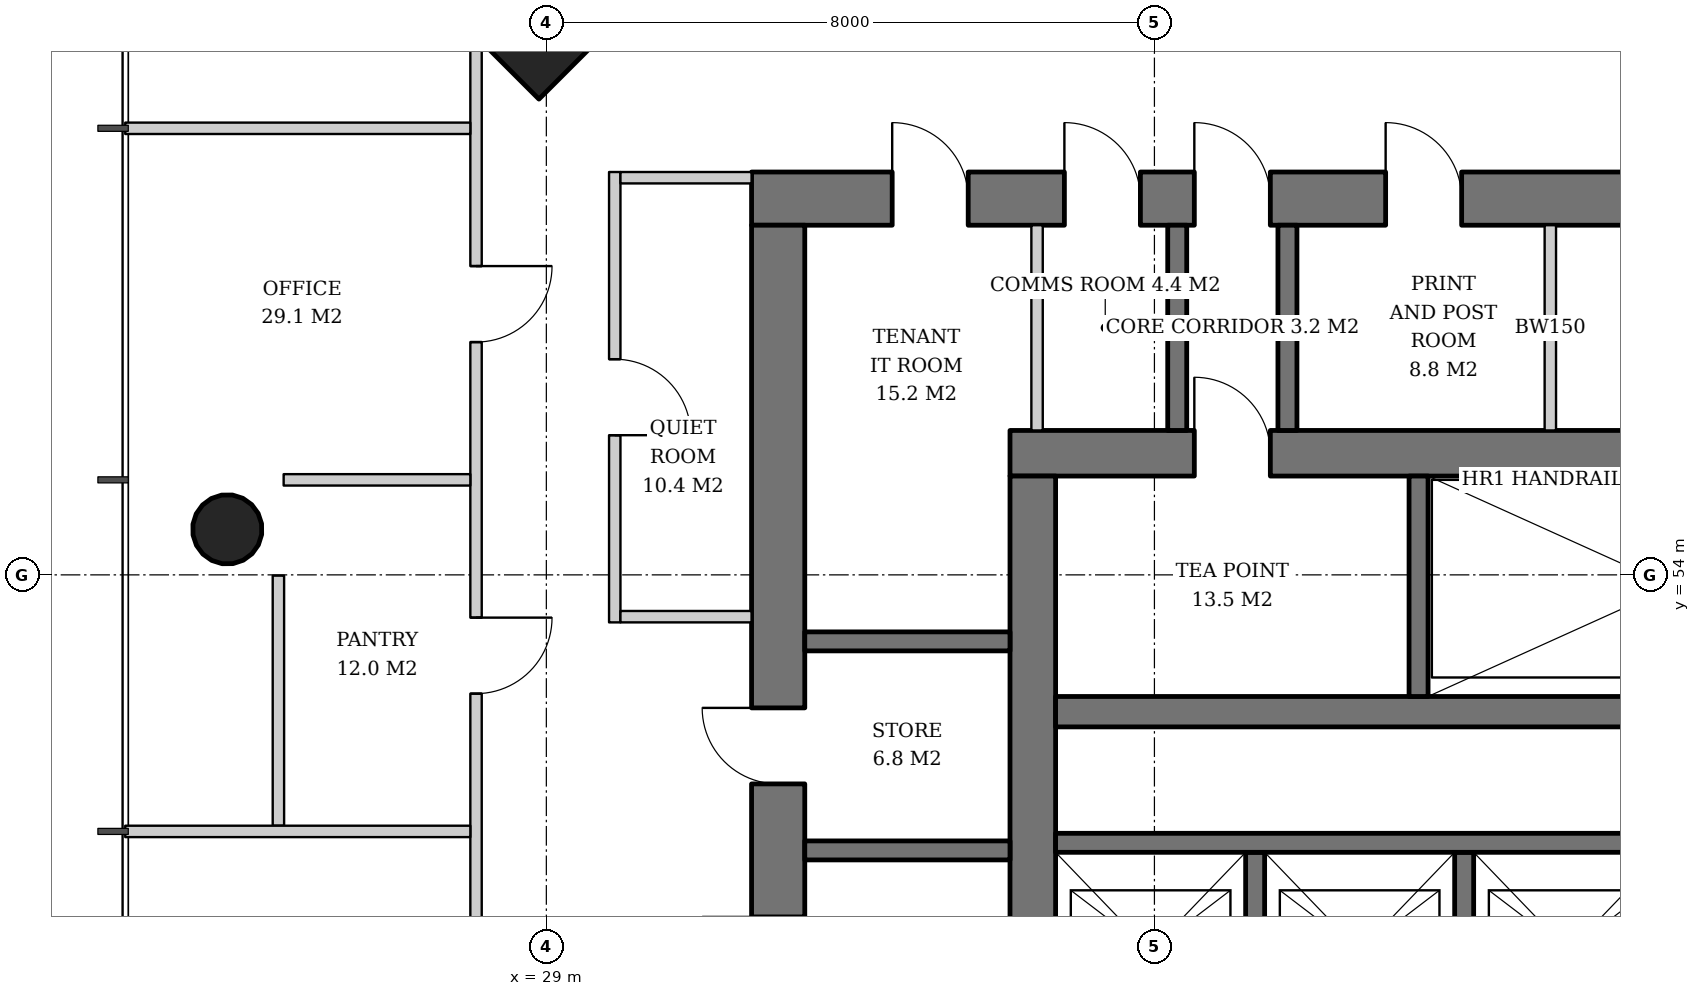
"""IFC4 building model, lengths in metres.
Left out: names, types, materials, properties, quantities, classifications, styles, units other than length and angle.
Written with IfcOpenShell. Run it as: python <this file> out.ifc"""

import sys

from ifc_helpers import new_model, si_unit, direction, frame, frame_2d, origin, origin_2d, place, context, subcontext, project, spatial, rectangle, hollow_circle, extrude, element, fill, save


model = new_model("IFC4")
c1 = context("Model", 3, precision=1e-05, world=origin(), true_north=direction((0.0, 1.0)))
c2 = subcontext(c1, "Body", "Model", "MODEL_VIEW")
j1 = project(units=[si_unit("LENGTHUNIT", "METRE"), si_unit("PLANEANGLEUNIT", "RADIAN")], contexts=[c1])
p1 = place(None, origin())
s1 = spatial("IfcSite", under=j1, at=p1, CompositionType="ELEMENT")
p2 = place(p1, origin())
s2 = spatial("IfcBuilding", under=s1, at=p2, CompositionType="ELEMENT")
p3 = place(p2, frame((0.0, 0.0, 138.8)))
s3 = spatial("IfcBuildingStorey", under=s2, at=p3, CompositionType="ELEMENT", Elevation=138.8)
p4 = place(p3, frame((28.864, 62.136, 0.0), z_axis=(0.031898107953, -0.031898107953, 0.998981992539), x_axis=(0.707106781187, 0.707106781187, 0.0)))
e1 = element("IfcColumn", 1, at=p4, inside=s3, PredefinedType="COLUMN", context=c2, shape_type="SweptSolid", body=[
    extrude(rectangle(XDim=2.6, YDim=2.6, at=origin_2d()), origin(), (0.0, 0.0, 1.0), 3.804),
])
p5 = place(p3, frame((24.764, 54.618, 0.0), z_axis=(0.031910269556, -0.015987237665, 0.999362868496), x_axis=(0.447933021895, 0.894067115991, 0.0)))
e2 = element("IfcColumn", 2, at=p5, inside=s3, PredefinedType="COLUMN", context=c2, shape_type="SweptSolid", body=[
    extrude(hollow_circle(Radius=0.457, WallThickness=0.03, at=origin_2d()), origin(), (0.0, 0.0, 1.0), 3.802),
])
p6 = place(p3, frame((35.1, 55.6, 0.0), z_axis=(0.0, 0.0, 1.0), x_axis=(1.0, 0.0, 0.0)))
e3 = element("IfcWall", 3, at=p6, inside=s3, PredefinedType="SHEAR", context=c2, shape_type="SweptSolid", body=[
    extrude(rectangle(XDim=19.8, YDim=0.6, at=frame_2d((9.9, 0.0))), origin(), (0.0, 0.0, 1.0), 3.8),
])
p7 = place(p6, frame((14.54, 0.0, 0.0)))
e4 = element("IfcOpeningElement", 4, at=p7, cuts=e3, PredefinedType="OPENING", context=c2, shape_type="SweptSolid", body=[
    extrude(rectangle(XDim=1.0, YDim=2.1, at=frame_2d((0.5, 1.05))), frame((0.0, 0.31, 0.0), z_axis=(0.0, -1.0, 0.0), x_axis=(1.0, 0.0, 0.0)), (0.0, 0.0, 1.0), 0.62),
])
p8 = place(p6, frame((2.425, 0.0, 0.0)))
e5 = element("IfcOpeningElement", 5, at=p8, cuts=e3, PredefinedType="OPENING", context=c2, shape_type="SweptSolid", body=[
    extrude(rectangle(XDim=1.0, YDim=2.1, at=frame_2d((0.5, 1.05))), frame((0.0, 0.31, 0.0), z_axis=(0.0, -1.0, 0.0), x_axis=(1.0, 0.0, 0.0)), (0.0, 0.0, 1.0), 0.62),
])
p9 = place(p3, frame((35.4, 36.7, 0.0), z_axis=(0.0, 0.0, 1.0), x_axis=(0.0, 1.0, 0.0)))
e6 = element("IfcWall", 6, at=p9, inside=s3, PredefinedType="SHEAR", context=c2, shape_type="SweptSolid", body=[
    extrude(rectangle(XDim=18.6, YDim=0.6, at=frame_2d((9.3, 0.0))), origin(), (0.0, 0.0, 1.0), 3.8),
])
p10 = place(p9, frame((8.4, 0.0, 0.0)))
e7 = element("IfcOpeningElement", 7, at=p10, cuts=e6, PredefinedType="OPENING", context=c2, shape_type="SweptSolid", body=[
    extrude(rectangle(XDim=1.8, YDim=2.4, at=frame_2d((0.9, 1.2))), frame((0.0, 0.31, 0.0), z_axis=(0.0, -1.0, 0.0), x_axis=(1.0, 0.0, 0.0)), (0.0, 0.0, 1.0), 0.62),
])
p11 = place(p3, frame((31.7, 58.95, 0.0), z_axis=(0.0, 0.0, 1.0), x_axis=(1.0, 0.0, 0.0)))
e8 = element("IfcWall", 8, at=p11, inside=s3, PredefinedType="SHEAR", context=c2, shape_type="SweptSolid", body=[
    extrude(rectangle(XDim=26.6, YDim=0.7, at=frame_2d((13.3, 0.0))), origin(), (0.0, 0.0, 1.0), 3.8),
])
p12 = place(p11, frame((17.94, 0.0, 0.0)))
e9 = element("IfcOpeningElement", 9, at=p12, cuts=e8, PredefinedType="OPENING", context=c2, shape_type="SweptSolid", body=[
    extrude(rectangle(XDim=1.0, YDim=2.1, at=frame_2d((0.5, 1.05))), frame((0.0, 0.36, 0.0), z_axis=(0.0, -1.0, 0.0), x_axis=(1.0, 0.0, 0.0)), (0.0, 0.0, 1.0), 0.72),
])
p13 = place(p11, frame((5.825, 0.0, 0.0)))
e10 = element("IfcOpeningElement", 10, at=p13, cuts=e8, PredefinedType="OPENING", context=c2, shape_type="SweptSolid", body=[
    extrude(rectangle(XDim=1.0, YDim=2.1, at=frame_2d((0.5, 1.05))), frame((0.0, 0.36, 0.0), z_axis=(0.0, -1.0, 0.0), x_axis=(1.0, 0.0, 0.0)), (0.0, 0.0, 1.0), 0.72),
])
p14 = place(p11, frame((1.85, 0.0, 0.0)))
e11 = element("IfcOpeningElement", 11, at=p14, cuts=e8, PredefinedType="OPENING", context=c2, shape_type="SweptSolid", body=[
    extrude(rectangle(XDim=1.0, YDim=2.1, at=frame_2d((0.5, 1.05))), frame((0.0, 0.36, 0.0), z_axis=(0.0, -1.0, 0.0), x_axis=(1.0, 0.0, 0.0)), (0.0, 0.0, 1.0), 0.72),
])
p15 = place(p11, frame((4.115, 0.0, 0.0)))
e12 = element("IfcOpeningElement", 12, at=p15, cuts=e8, PredefinedType="OPENING", context=c2, shape_type="SweptSolid", body=[
    extrude(rectangle(XDim=1.0, YDim=2.1, at=frame_2d((0.5, 1.05))), frame((0.0, 0.36, 0.0), z_axis=(0.0, -1.0, 0.0), x_axis=(1.0, 0.0, 0.0)), (0.0, 0.0, 1.0), 0.72),
])
p16 = place(p11, frame((8.342, 0.0, 0.0)))
e13 = element("IfcOpeningElement", 13, at=p16, cuts=e8, PredefinedType="OPENING", context=c2, shape_type="SweptSolid", body=[
    extrude(rectangle(XDim=1.0, YDim=2.1, at=frame_2d((0.5, 1.05))), frame((0.0, 0.36, 0.0), z_axis=(0.0, -1.0, 0.0), x_axis=(1.0, 0.0, 0.0)), (0.0, 0.0, 1.0), 0.72),
])
p17 = place(p11, frame((11.626, 0.0, 0.0)))
e14 = element("IfcOpeningElement", 14, at=p17, cuts=e8, PredefinedType="OPENING", context=c2, shape_type="SweptSolid", body=[
    extrude(rectangle(XDim=1.0, YDim=2.1, at=frame_2d((0.5, 1.05))), frame((0.0, 0.36, 0.0), z_axis=(0.0, -1.0, 0.0), x_axis=(1.0, 0.0, 0.0)), (0.0, 0.0, 1.0), 0.72),
])
p18 = place(p11, frame((14.862, 0.0, 0.0)))
e15 = element("IfcOpeningElement", 15, at=p18, cuts=e8, PredefinedType="OPENING", context=c2, shape_type="SweptSolid", body=[
    extrude(rectangle(XDim=1.0, YDim=2.1, at=frame_2d((0.5, 1.05))), frame((0.0, 0.36, 0.0), z_axis=(0.0, -1.0, 0.0), x_axis=(1.0, 0.0, 0.0)), (0.0, 0.0, 1.0), 0.72),
])
p19 = place(p11, frame((20.9, 0.0, 0.0)))
e16 = element("IfcOpeningElement", 16, at=p19, cuts=e8, PredefinedType="OPENING", context=c2, shape_type="SweptSolid", body=[
    extrude(rectangle(XDim=1.0, YDim=2.1, at=frame_2d((0.5, 1.05))), frame((0.0, 0.36, 0.0), z_axis=(0.0, -1.0, 0.0), x_axis=(1.0, 0.0, 0.0)), (0.0, 0.0, 1.0), 0.72),
])
p20 = place(p11, frame((23.75, 0.0, 0.0)))
e17 = element("IfcOpeningElement", 17, at=p20, cuts=e8, PredefinedType="OPENING", context=c2, shape_type="SweptSolid", body=[
    extrude(rectangle(XDim=1.0, YDim=2.1, at=frame_2d((0.5, 1.05))), frame((0.0, 0.36, 0.0), z_axis=(0.0, -1.0, 0.0), x_axis=(1.0, 0.0, 0.0)), (0.0, 0.0, 1.0), 0.72),
])
p21 = place(p3, frame((32.05, 33.4, 0.0), z_axis=(0.0, 0.0, 1.0), x_axis=(0.0, 1.0, 0.0)))
e18 = element("IfcWall", 18, at=p21, inside=s3, PredefinedType="SHEAR", context=c2, shape_type="SweptSolid", body=[
    extrude(rectangle(XDim=25.2, YDim=0.7, at=frame_2d((12.6, 0.0))), origin(), (0.0, 0.0, 1.0), 3.8),
])
p22 = place(p21, frame((11.7, 0.0, 0.0)))
e19 = element("IfcOpeningElement", 19, at=p22, cuts=e18, PredefinedType="OPENING", context=c2, shape_type="SweptSolid", body=[
    extrude(rectangle(XDim=1.8, YDim=2.4, at=frame_2d((0.9, 1.2))), frame((0.0, 0.36, 0.0), z_axis=(0.0, -1.0, 0.0), x_axis=(1.0, 0.0, 0.0)), (0.0, 0.0, 1.0), 0.72),
])
p23 = place(p21, frame((3.6, 0.0, 0.0)))
e20 = element("IfcOpeningElement", 20, at=p23, cuts=e18, PredefinedType="OPENING", context=c2, shape_type="SweptSolid", body=[
    extrude(rectangle(XDim=1.0, YDim=2.1, at=frame_2d((0.5, 1.05))), frame((0.0, 0.36, 0.0), z_axis=(0.0, -1.0, 0.0), x_axis=(1.0, 0.0, 0.0)), (0.0, 0.0, 1.0), 0.72),
])
p24 = place(p21, frame((6.35, 0.0, 0.0)))
e21 = element("IfcOpeningElement", 21, at=p24, cuts=e18, PredefinedType="OPENING", context=c2, shape_type="SweptSolid", body=[
    extrude(rectangle(XDim=1.0, YDim=2.1, at=frame_2d((0.5, 1.05))), frame((0.0, 0.36, 0.0), z_axis=(0.0, -1.0, 0.0), x_axis=(1.0, 0.0, 0.0)), (0.0, 0.0, 1.0), 0.72),
])
p25 = place(p21, frame((9.1, 0.0, 0.0)))
e22 = element("IfcOpeningElement", 22, at=p25, cuts=e18, PredefinedType="OPENING", context=c2, shape_type="SweptSolid", body=[
    extrude(rectangle(XDim=1.0, YDim=2.1, at=frame_2d((0.5, 1.05))), frame((0.0, 0.36, 0.0), z_axis=(0.0, -1.0, 0.0), x_axis=(1.0, 0.0, 0.0)), (0.0, 0.0, 1.0), 0.72),
])
p26 = place(p21, frame((15.1, 0.0, 0.0)))
e23 = element("IfcOpeningElement", 23, at=p26, cuts=e18, PredefinedType="OPENING", context=c2, shape_type="SweptSolid", body=[
    extrude(rectangle(XDim=1.0, YDim=2.1, at=frame_2d((0.5, 1.05))), frame((0.0, 0.36, 0.0), z_axis=(0.0, -1.0, 0.0), x_axis=(1.0, 0.0, 0.0)), (0.0, 0.0, 1.0), 0.72),
])
p27 = place(p21, frame((17.85, 0.0, 0.0)))
e24 = element("IfcOpeningElement", 24, at=p27, cuts=e18, PredefinedType="OPENING", context=c2, shape_type="SweptSolid", body=[
    extrude(rectangle(XDim=1.0, YDim=2.1, at=frame_2d((0.5, 1.05))), frame((0.0, 0.36, 0.0), z_axis=(0.0, -1.0, 0.0), x_axis=(1.0, 0.0, 0.0)), (0.0, 0.0, 1.0), 0.72),
])
p28 = place(p3, frame((35.7, 52.2, 0.0), z_axis=(0.0, 0.0, 1.0), x_axis=(1.0, 0.0, 0.0)))
e25 = element("IfcWall", 25, at=p28, inside=s3, PredefinedType="SHEAR", context=c2, shape_type="SweptSolid", body=[
    extrude(rectangle(XDim=18.6, YDim=0.4, at=frame_2d((9.3, 0.0))), origin(), (0.0, 0.0, 1.0), 3.8),
])
p29 = place(p3, frame((40.475, 52.4, 0.0), z_axis=(0.0, 0.0, 1.0), x_axis=(0.0, 1.0, 0.0)))
e26 = element("IfcWall", 26, at=p29, inside=s3, PredefinedType="SHEAR", context=c2, shape_type="SweptSolid", body=[
    extrude(rectangle(XDim=2.9, YDim=0.25, at=frame_2d((1.45, 0.0))), origin(), (0.0, 0.0, 1.0), 3.8),
])
for number, where, z_axis, x_axis in (
    (27, (38.325, 47.75, 0.0), (0.0, 0.0, 1.0), (0.0, 1.0, 0.0)),
    (28, (41.075, 47.75, 0.0), (0.0, 0.0, 1.0), (0.0, 1.0, 0.0)),
):
    element("IfcWall", number, at=place(p3, frame(where, z_axis=z_axis, x_axis=x_axis)), inside=s3, PredefinedType="SHEAR", context=c2, shape_type="SweptSolid", body=[
        extrude(rectangle(XDim=2.6, YDim=0.25, at=frame_2d((1.3, 0.0))), origin(), (0.0, 0.0, 1.0), 3.8),
    ])
p30 = place(p3, frame((35.7, 50.475, 0.0), z_axis=(0.0, 0.0, 1.0), x_axis=(1.0, 0.0, 0.0)))
e29 = element("IfcWall", 29, at=p30, inside=s3, PredefinedType="SHEAR", context=c2, shape_type="SweptSolid", body=[
    extrude(rectangle(XDim=11.0, YDim=0.25, at=frame_2d((5.5, 0.0))), origin(), (0.0, 0.0, 1.0), 3.8),
])
for number, where, z_axis, x_axis in (
    (30, (32.4, 50.375, 0.0), (0.0, 0.0, 1.0), (1.0, 0.0, 0.0)),
    (31, (32.4, 53.125, 0.0), (0.0, 0.0, 1.0), (1.0, 0.0, 0.0)),
):
    element("IfcWall", number, at=place(p3, frame(where, z_axis=z_axis, x_axis=x_axis)), inside=s3, PredefinedType="SHEAR", context=c2, shape_type="SweptSolid", body=[
        extrude(rectangle(XDim=2.7, YDim=0.25, at=frame_2d((1.35, 0.0))), origin(), (0.0, 0.0, 1.0), 3.8),
    ])
for number, where, z_axis, x_axis in (
    (32, (37.3, 55.9, 0.0), (0.0, 0.0, 1.0), (0.0, 1.0, 0.0)),
    (33, (38.75, 55.9, 0.0), (0.0, 0.0, 1.0), (0.0, 1.0, 0.0)),
):
    element("IfcWall", number, at=place(p3, frame(where, z_axis=z_axis, x_axis=x_axis)), inside=s3, PredefinedType="SOLIDWALL", context=c2, shape_type="SweptSolid", body=[
        extrude(rectangle(XDim=2.7, YDim=0.25, at=frame_2d((1.35, 0.0))), origin(), (0.0, 0.0, 1.0), 3.62),
    ])
for number, where, z_axis, x_axis in (
    (34, (35.456, 55.9, 0.0), (0.0, 0.0, 1.0), (0.0, 1.0, 0.0)),
    (35, (42.209, 55.9, 0.0), (0.0, 0.0, 1.0), (0.0, 1.0, 0.0)),
):
    element("IfcWall", number, at=place(p3, frame(where, z_axis=z_axis, x_axis=x_axis)), inside=s3, PredefinedType="SOLIDWALL", context=c2, shape_type="SweptSolid", body=[
        extrude(rectangle(XDim=2.7, YDim=0.15, at=frame_2d((1.35, 0.0))), origin(), (0.0, 0.0, 1.0), 3.62),
    ])
p31 = place(p3, frame((29.9, 59.3, 0.0), z_axis=(0.0, 0.0, 1.0), x_axis=(0.0, -1.0, 0.0)))
e36 = element("IfcWall", 36, at=p31, inside=s3, PredefinedType="PARTITIONING", context=c2, shape_type="SweptSolid", body=[
    extrude(rectangle(XDim=5.925, YDim=0.15, at=frame_2d((2.962, 0.0))), origin(), (0.0, 0.0, 1.0), 2.72),
])
p32 = place(p31, frame((2.462, 0.0, 0.0)))
e37 = element("IfcOpeningElement", 37, at=p32, cuts=e36, PredefinedType="OPENING", context=c2, shape_type="SweptSolid", body=[
    extrude(rectangle(XDim=1.0, YDim=2.1, at=frame_2d((0.5, 1.05))), frame((0.0, 0.085, 0.0), z_axis=(0.0, -1.0, 0.0), x_axis=(1.0, 0.0, 0.0)), (0.0, 0.0, 1.0), 0.17),
])
for number, where, z_axis, x_axis in (
    (38, (31.7, 59.225, 0.0), (0.0, 0.0, 1.0), (-1.0, 0.0, 0.0)),
    (39, (31.7, 53.45, 0.0), (0.0, 0.0, 1.0), (-1.0, 0.0, 0.0)),
):
    element("IfcWall", number, at=place(p3, frame(where, z_axis=z_axis, x_axis=x_axis)), inside=s3, PredefinedType="PARTITIONING", context=c2, shape_type="SweptSolid", body=[
        extrude(rectangle(XDim=1.725, YDim=0.15, at=frame_2d((0.862, 0.0))), origin(), (0.0, 0.0, 1.0), 3.62),
    ])
p33 = place(p3, frame((25.475, 53.99, 0.0), z_axis=(0.0, 0.0, 1.0), x_axis=(0.0, -1.0, 0.0)))
e40 = element("IfcWall", 40, at=p33, inside=s3, PredefinedType="PARTITIONING", context=c2, shape_type="SweptSolid", body=[
    extrude(rectangle(XDim=3.29, YDim=0.15, at=frame_2d((1.645, 0.0))), origin(), (0.0, 0.0, 1.0), 2.858),
])
p34 = place(p3, frame((28.075, 61.011, 0.0), z_axis=(0.0, 0.0, 1.0), x_axis=(0.0, -1.0, 0.0)))
e41 = element("IfcWall", 41, at=p34, inside=s3, PredefinedType="PARTITIONING", context=c2, shape_type="SweptSolid", body=[
    extrude(rectangle(XDim=30.023, YDim=0.15, at=frame_2d((15.011, 0.0))), origin(), (0.0, 0.0, 1.0), 2.72),
])
p35 = place(p34, frame((2.949, 0.0, 0.0)))
e42 = element("IfcOpeningElement", 42, at=p35, cuts=e41, PredefinedType="OPENING", context=c2, shape_type="SweptSolid", body=[
    extrude(rectangle(XDim=1.0, YDim=2.1, at=frame_2d((0.5, 1.05))), frame((0.0, 0.085, 0.0), z_axis=(0.0, -1.0, 0.0), x_axis=(1.0, 0.0, 0.0)), (0.0, 0.0, 1.0), 0.17),
])
p36 = place(p34, frame((7.574, 0.0, 0.0)))
e43 = element("IfcOpeningElement", 43, at=p36, cuts=e41, PredefinedType="OPENING", context=c2, shape_type="SweptSolid", body=[
    extrude(rectangle(XDim=1.0, YDim=2.1, at=frame_2d((0.5, 1.05))), frame((0.0, 0.085, 0.0), z_axis=(0.0, -1.0, 0.0), x_axis=(1.0, 0.0, 0.0)), (0.0, 0.0, 1.0), 0.17),
])
p37 = place(p34, frame((12.199, 0.0, 0.0)))
e44 = element("IfcOpeningElement", 44, at=p37, cuts=e41, PredefinedType="OPENING", context=c2, shape_type="SweptSolid", body=[
    extrude(rectangle(XDim=1.0, YDim=2.1, at=frame_2d((0.5, 1.05))), frame((0.0, 0.085, 0.0), z_axis=(0.0, -1.0, 0.0), x_axis=(1.0, 0.0, 0.0)), (0.0, 0.0, 1.0), 0.17),
])
p38 = place(p34, frame((16.924, 0.0, 0.0)))
e45 = element("IfcOpeningElement", 45, at=p38, cuts=e41, PredefinedType="OPENING", context=c2, shape_type="SweptSolid", body=[
    extrude(rectangle(XDim=0.8, YDim=2.1, at=frame_2d((0.4, 1.05))), frame((0.0, 0.085, 0.0), z_axis=(0.0, -1.0, 0.0), x_axis=(1.0, 0.0, 0.0)), (0.0, 0.0, 1.0), 0.17),
])
p39 = place(p34, frame((21.449, 0.0, 0.0)))
e46 = element("IfcOpeningElement", 46, at=p39, cuts=e41, PredefinedType="OPENING", context=c2, shape_type="SweptSolid", body=[
    extrude(rectangle(XDim=1.0, YDim=2.1, at=frame_2d((0.5, 1.05))), frame((0.0, 0.085, 0.0), z_axis=(0.0, -1.0, 0.0), x_axis=(1.0, 0.0, 0.0)), (0.0, 0.0, 1.0), 0.17),
])
p40 = place(p34, frame((26.174, 0.0, 0.0)))
e47 = element("IfcOpeningElement", 47, at=p40, cuts=e41, PredefinedType="OPENING", context=c2, shape_type="SweptSolid", body=[
    extrude(rectangle(XDim=0.8, YDim=2.1, at=frame_2d((0.4, 1.05))), frame((0.0, 0.085, 0.0), z_axis=(0.0, -1.0, 0.0), x_axis=(1.0, 0.0, 0.0)), (0.0, 0.0, 1.0), 0.17),
])
p41 = place(p3, frame((28.0, 59.875, 0.0), z_axis=(0.0, 0.0, 1.0), x_axis=(-1.0, 0.0, 0.0)))
e48 = element("IfcWall", 48, at=p41, inside=s3, PredefinedType="PARTITIONING", context=c2, shape_type="SweptSolid", body=[
    extrude(rectangle(XDim=4.54, YDim=0.15, at=frame_2d((2.27, 0.0))), origin(), (0.0, 0.0, 1.0), 2.82),
])
p42 = place(p3, frame((28.0, 55.25, 0.0), z_axis=(0.0, 0.0, 1.0), x_axis=(-1.0, 0.0, 0.0)))
e49 = element("IfcWall", 49, at=p42, inside=s3, PredefinedType="PARTITIONING", context=c2, shape_type="SweptSolid", body=[
    extrude(rectangle(XDim=2.456, YDim=0.15, at=frame_2d((1.228, 0.0))), origin(), (0.0, 0.0, 1.0), 3.62),
])
p43 = place(p3, frame((28.0, 50.625, 0.0), z_axis=(0.0, 0.0, 1.0), x_axis=(-1.0, 0.0, 0.0)))
e50 = element("IfcWall", 50, at=p43, inside=s3, PredefinedType="PARTITIONING", context=c2, shape_type="SweptSolid", body=[
    extrude(rectangle(XDim=4.54, YDim=0.15, at=frame_2d((2.27, 0.0))), origin(), (0.0, 0.0, 1.0), 2.82),
])
p44 = place(p13, origin())
e51 = element("IfcDoor", 51, at=p44, inside=s3, OperationType="SINGLE_SWING_LEFT", PredefinedType="DOOR", context=c2, shape_type="SweptSolid", body=[
    extrude(rectangle(XDim=1.0, YDim=2.1, at=frame_2d((0.5, 1.05))), frame((0.0, 0.025, 0.0), z_axis=(0.0, -1.0, 0.0), x_axis=(1.0, 0.0, 0.0)), (0.0, 0.0, 1.0), 0.05),
])
fill(e10, e51)
p45 = place(p8, origin())
e52 = element("IfcDoor", 52, at=p45, inside=s3, OperationType="SINGLE_SWING_LEFT", PredefinedType="DOOR", context=c2, shape_type="SweptSolid", body=[
    extrude(rectangle(XDim=1.0, YDim=2.1, at=frame_2d((0.5, 1.05))), frame((0.0, -0.24, 0.0), z_axis=(0.0, -1.0, 0.0), x_axis=(1.0, 0.0, 0.0)), (0.0, 0.0, 1.0), 0.05),
])
fill(e5, e52)
p46 = place(p27, origin())
e53 = element("IfcDoor", 53, at=p46, inside=s3, OperationType="SINGLE_SWING_RIGHT", PredefinedType="DOOR", context=c2, shape_type="SweptSolid", body=[
    extrude(rectangle(XDim=1.0, YDim=2.1, at=frame_2d((0.5, 1.05))), frame((0.0, -0.29, 0.0), z_axis=(0.0, -1.0, 0.0), x_axis=(1.0, 0.0, 0.0)), (0.0, 0.0, 1.0), 0.05),
])
fill(e24, e53)
p47 = place(p14, origin())
e54 = element("IfcDoor", 54, at=p47, inside=s3, OperationType="SINGLE_SWING_LEFT", PredefinedType="DOOR", context=c2, shape_type="SweptSolid", body=[
    extrude(rectangle(XDim=1.0, YDim=2.1, at=frame_2d((0.5, 1.05))), frame((0.0, -0.29, 0.0), z_axis=(0.0, -1.0, 0.0), x_axis=(1.0, 0.0, 0.0)), (0.0, 0.0, 1.0), 0.05),
])
fill(e11, e54)
p48 = place(p15, origin())
e55 = element("IfcDoor", 55, at=p48, inside=s3, OperationType="SINGLE_SWING_LEFT", PredefinedType="DOOR", context=c2, shape_type="SweptSolid", body=[
    extrude(rectangle(XDim=1.0, YDim=2.1, at=frame_2d((0.5, 1.05))), frame((0.0, -0.29, 0.0), z_axis=(0.0, -1.0, 0.0), x_axis=(1.0, 0.0, 0.0)), (0.0, 0.0, 1.0), 0.05),
])
fill(e12, e55)
p49 = place(p16, origin())
e56 = element("IfcDoor", 56, at=p49, inside=s3, OperationType="SINGLE_SWING_LEFT", PredefinedType="DOOR", context=c2, shape_type="SweptSolid", body=[
    extrude(rectangle(XDim=1.0, YDim=2.1, at=frame_2d((0.5, 1.05))), frame((0.0, -0.29, 0.0), z_axis=(0.0, -1.0, 0.0), x_axis=(1.0, 0.0, 0.0)), (0.0, 0.0, 1.0), 0.05),
])
fill(e13, e56)
p50 = place(p32, origin())
e57 = element("IfcDoor", 57, at=p50, inside=s3, OperationType="SINGLE_SWING_RIGHT", PredefinedType="DOOR", context=c2, shape_type="SweptSolid", body=[
    extrude(rectangle(XDim=1.0, YDim=2.1, at=frame_2d((0.5, 1.05))), frame((0.0, 0.025, 0.0), z_axis=(0.0, -1.0, 0.0), x_axis=(1.0, 0.0, 0.0)), (0.0, 0.0, 1.0), 0.05),
])
fill(e37, e57)
p51 = place(p35, origin())
e58 = element("IfcDoor", 58, at=p51, inside=s3, OperationType="SINGLE_SWING_LEFT", PredefinedType="DOOR", context=c2, shape_type="SweptSolid", body=[
    extrude(rectangle(XDim=1.0, YDim=2.1, at=frame_2d((0.5, 1.05))), frame((0.0, 0.025, 0.0), z_axis=(0.0, -1.0, 0.0), x_axis=(1.0, 0.0, 0.0)), (0.0, 0.0, 1.0), 0.05),
])
fill(e42, e58)
p52 = place(p36, origin())
e59 = element("IfcDoor", 59, at=p52, inside=s3, OperationType="SINGLE_SWING_LEFT", PredefinedType="DOOR", context=c2, shape_type="SweptSolid", body=[
    extrude(rectangle(XDim=1.0, YDim=2.1, at=frame_2d((0.5, 1.05))), frame((0.0, 0.025, 0.0), z_axis=(0.0, -1.0, 0.0), x_axis=(1.0, 0.0, 0.0)), (0.0, 0.0, 1.0), 0.05),
])
fill(e43, e59)
save(model, sys.argv[1])
